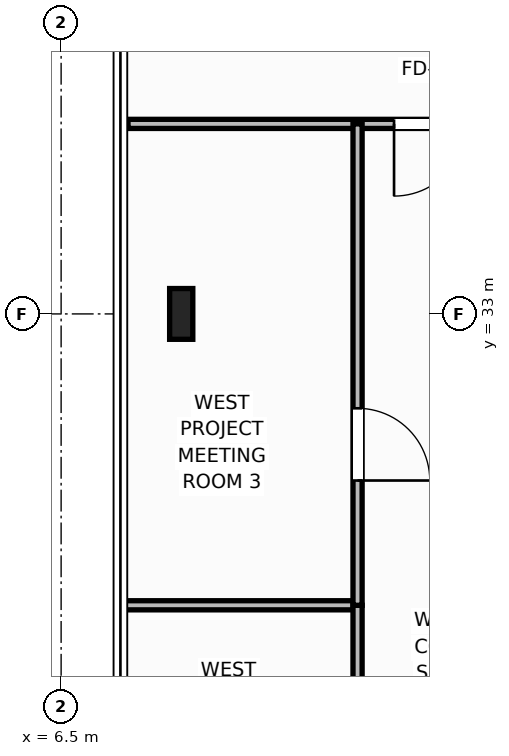
"""IFC4 building model, lengths in metres.
Left out: names, types, materials, properties, quantities, classifications, styles, units other than length and angle.
Written with IfcOpenShell. Run it as: python <this file> out.ifc"""

import sys

from ifc_helpers import new_model, si_unit, direction, frame, frame_2d, origin, origin_2d, place, context, subcontext, project, spatial, rectangle, i_section, extrude, element, fill, save


model = new_model("IFC4")
c1 = context("Model", 3, precision=1e-05, world=origin(), true_north=direction((0.0, 1.0)))
c2 = subcontext(c1, "Body", "Model", "MODEL_VIEW")
j1 = project(units=[si_unit("LENGTHUNIT", "METRE"), si_unit("PLANEANGLEUNIT", "RADIAN")], contexts=[c1])
p1 = place(None, origin())
s1 = spatial("IfcSite", under=j1, at=p1, CompositionType="ELEMENT")
p2 = place(p1, origin())
s2 = spatial("IfcBuilding", under=s1, at=p2, CompositionType="ELEMENT")
p3 = place(p2, frame((0.0, 0.0, 294.4)))
s3 = spatial("IfcBuildingStorey", under=s2, at=p3, CompositionType="ELEMENT", Elevation=294.4)
p4 = place(p3, frame((8.08, 33.0, 0.0), z_axis=(0.0, 0.0, 1.0), x_axis=(1.0, 0.0, 0.0)))
e1 = element("IfcColumn", 1, at=p4, inside=s3, PredefinedType="COLUMN", context=c2, shape_type="SweptSolid", body=[
    extrude(i_section(OverallWidth=0.305, OverallDepth=0.668, WebThickness=0.021, FlangeThickness=0.04, at=origin_2d()), origin(), (0.0, 0.0, 1.0), 4.0),
])
p5 = place(p3, frame((7.38, 35.5, 0.0), z_axis=(0.0, 0.0, 1.0), x_axis=(1.0, 0.0, 0.0)))
e2 = element("IfcWall", 2, at=p5, inside=s3, PredefinedType="PARTITIONING", context=c2, shape_type="SweptSolid", body=[
    extrude(rectangle(XDim=5.891, YDim=0.12, at=frame_2d((2.946, 0.0))), origin(), (0.0, 0.0, 1.0), 3.788),
])
p6 = place(p5, frame((3.5, 0.0, 0.0)))
e3 = element("IfcOpeningElement", 3, at=p6, cuts=e2, PredefinedType="OPENING", context=c2, shape_type="SweptSolid", body=[
    extrude(rectangle(XDim=0.95, YDim=2.15, at=frame_2d((0.475, 1.075))), frame((0.0, 0.07, 0.0), z_axis=(0.0, -1.0, 0.0), x_axis=(1.0, 0.0, 0.0)), (0.0, 0.0, 1.0), 0.14),
])
p7 = place(p3, frame((7.22, 29.167, 0.0), z_axis=(0.0, 0.0, 1.0), x_axis=(1.0, 0.0, 0.0)))
e4 = element("IfcWall", 4, at=p7, inside=s3, PredefinedType="PARTITIONING", context=c2, shape_type="SweptSolid", body=[
    extrude(rectangle(XDim=3.18, YDim=0.12, at=frame_2d((1.59, 0.0))), origin(), (0.0, 0.0, 1.0), 3.788),
])
p8 = place(p3, frame((10.4, 22.833, 0.0), z_axis=(0.0, 0.0, 1.0), x_axis=(0.0, 1.0, 0.0)))
e5 = element("IfcWall", 5, at=p8, inside=s3, PredefinedType="PARTITIONING", context=c2, shape_type="SweptSolid", body=[
    extrude(rectangle(XDim=6.333, YDim=0.12, at=frame_2d((3.167, 0.0))), origin(), (0.0, 0.0, 1.0), 3.788),
])
p9 = place(p8, frame((2.692, 0.0, 0.0)))
e6 = element("IfcOpeningElement", 6, at=p9, cuts=e5, PredefinedType="OPENING", context=c2, shape_type="SweptSolid", body=[
    extrude(rectangle(XDim=0.95, YDim=2.15, at=frame_2d((0.475, 1.075))), frame((0.0, 0.07, 0.0), z_axis=(0.0, -1.0, 0.0), x_axis=(1.0, 0.0, 0.0)), (0.0, 0.0, 1.0), 0.14),
])
p10 = place(p3, frame((10.4, 29.167, 0.0), z_axis=(0.0, 0.0, 1.0), x_axis=(0.0, 1.0, 0.0)))
e7 = element("IfcWall", 7, at=p10, inside=s3, PredefinedType="PARTITIONING", context=c2, shape_type="SweptSolid", body=[
    extrude(rectangle(XDim=6.333, YDim=0.12, at=frame_2d((3.167, 0.0))), origin(), (0.0, 0.0, 1.0), 3.788),
])
p11 = place(p10, frame((1.642, 0.0, 0.0)))
e8 = element("IfcOpeningElement", 8, at=p11, cuts=e7, PredefinedType="OPENING", context=c2, shape_type="SweptSolid", body=[
    extrude(rectangle(XDim=0.95, YDim=2.15, at=frame_2d((0.475, 1.075))), frame((0.0, 0.07, 0.0), z_axis=(0.0, -1.0, 0.0), x_axis=(1.0, 0.0, 0.0)), (0.0, 0.0, 1.0), 0.14),
])
p12 = place(p6, origin())
e9 = element("IfcDoor", 9, at=p12, inside=s3, OperationType="SINGLE_SWING_RIGHT", PredefinedType="DOOR", context=c2, shape_type="SweptSolid", body=[
    extrude(rectangle(XDim=0.95, YDim=2.15, at=frame_2d((0.475, 1.075))), frame((0.0, 0.025, 0.0), z_axis=(0.0, -1.0, 0.0), x_axis=(1.0, 0.0, 0.0)), (0.0, 0.0, 1.0), 0.05),
])
fill(e3, e9)
p13 = place(p11, origin())
e10 = element("IfcDoor", 10, at=p13, inside=s3, OperationType="SINGLE_SWING_RIGHT", PredefinedType="DOOR", context=c2, shape_type="SweptSolid", body=[
    extrude(rectangle(XDim=0.95, YDim=2.15, at=frame_2d((0.475, 1.075))), frame((0.0, 0.025, 0.0), z_axis=(0.0, -1.0, 0.0), x_axis=(1.0, 0.0, 0.0)), (0.0, 0.0, 1.0), 0.05),
])
fill(e8, e10)
save(model, sys.argv[1])
